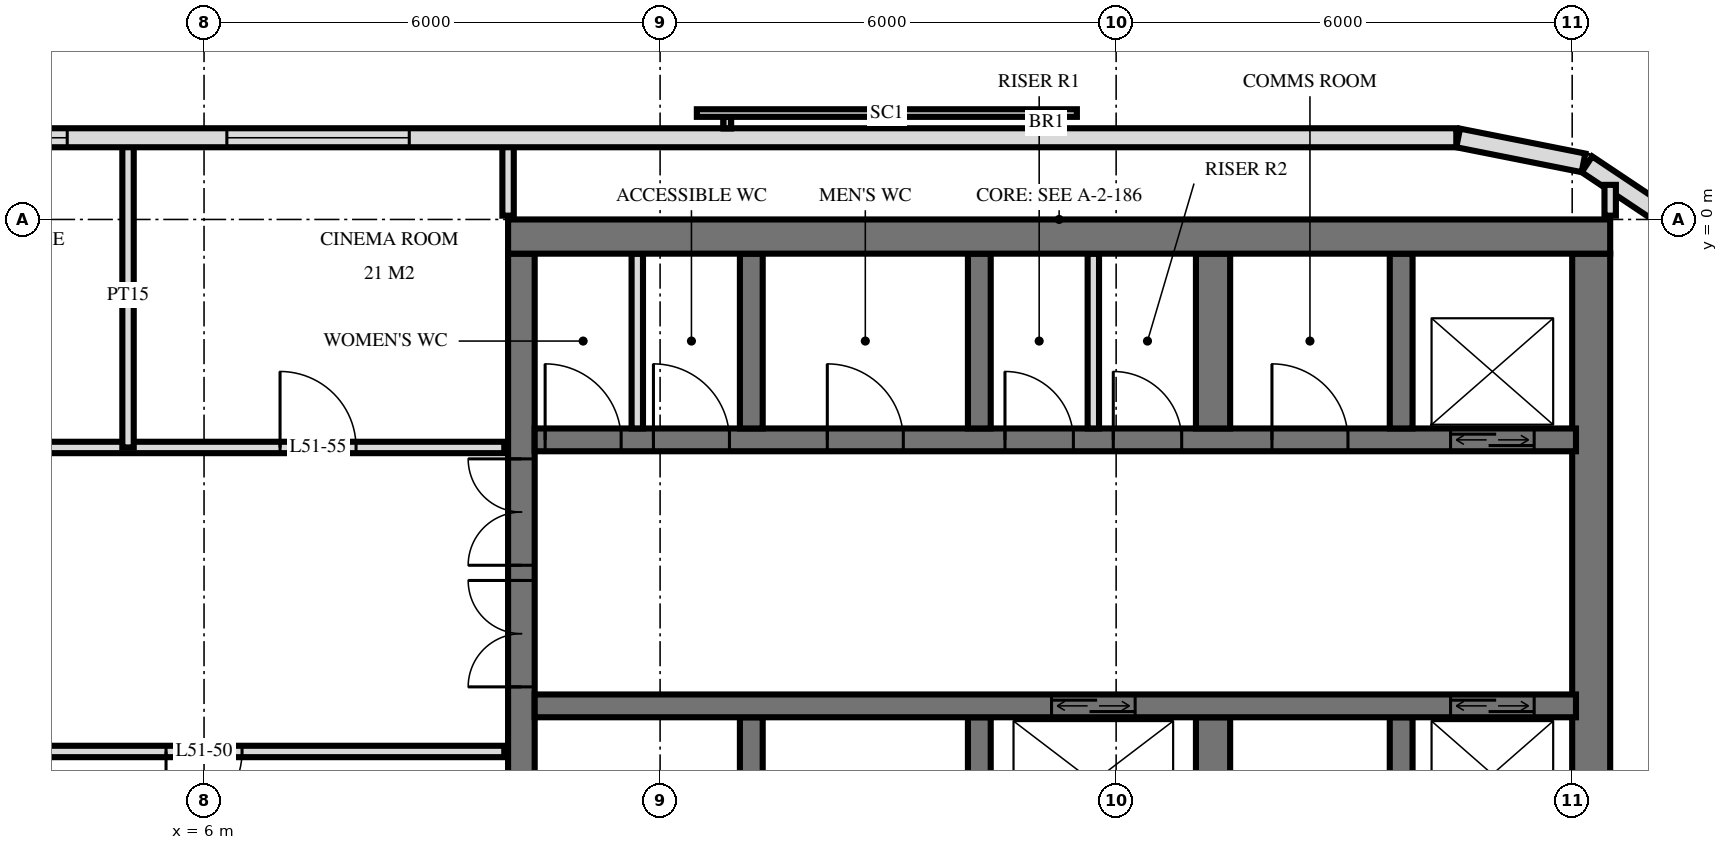
"""IFC4 building model, lengths in metres.
Left out: names, types, materials, properties, quantities, classifications, styles, units other than length and angle.
Written with IfcOpenShell. Run it as: python <this file> out.ifc"""

import sys

from ifc_helpers import new_model, si_unit, direction, frame, frame_2d, origin, place, context, subcontext, project, spatial, rectangle, extrude, element, fill, save


model = new_model("IFC4")
c1 = context("Model", 3, precision=1e-05, world=origin(), true_north=direction((0.0, 1.0)))
c2 = subcontext(c1, "Body", "Model", "MODEL_VIEW")
j1 = project(units=[si_unit("LENGTHUNIT", "METRE"), si_unit("PLANEANGLEUNIT", "RADIAN")], contexts=[c1])
p1 = place(None, origin())
s1 = spatial("IfcSite", under=j1, at=p1, CompositionType="ELEMENT")
p2 = place(p1, origin())
s2 = spatial("IfcBuilding", under=s1, at=p2, CompositionType="ELEMENT")
p3 = place(p2, frame((0.0, 0.0, 197.6)))
s3 = spatial("IfcBuildingStorey", under=s2, at=p3, CompositionType="ELEMENT", Elevation=197.6)
p4 = place(p3, frame((10.0, -0.225, 0.0), z_axis=(0.0, 0.0, 1.0), x_axis=(1.0, 0.0, 0.0)))
e1 = element("IfcWall", 1, at=p4, inside=s3, PredefinedType="SHEAR", context=c2, shape_type="SweptSolid", body=[
    extrude(rectangle(XDim=14.5, YDim=0.45, at=frame_2d((7.25, 0.0))), origin(), (0.0, 0.0, 1.0), 3.5),
])
p5 = place(p3, frame((10.175, -14.55, 0.0), z_axis=(0.0, 0.0, 1.0), x_axis=(0.0, 1.0, 0.0)))
e2 = element("IfcWall", 2, at=p5, inside=s3, PredefinedType="SHEAR", context=c2, shape_type="SweptSolid", body=[
    extrude(rectangle(XDim=14.1, YDim=0.35, at=frame_2d((7.05, 0.0))), origin(), (0.0, 0.0, 1.0), 3.5),
])
p6 = place(p5, frame((8.4, 0.0, 0.0)))
e3 = element("IfcOpeningElement", 3, at=p6, cuts=e2, PredefinedType="OPENING", context=c2, shape_type="SweptSolid", body=[
    extrude(rectangle(XDim=1.4, YDim=2.4, at=frame_2d((0.7, 1.2))), frame((0.0, 0.185, 0.0), z_axis=(0.0, -1.0, 0.0), x_axis=(1.0, 0.0, 0.0)), (0.0, 0.0, 1.0), 0.37),
])
p7 = place(p5, frame((10.0, 0.0, 0.0)))
e4 = element("IfcOpeningElement", 4, at=p7, cuts=e2, PredefinedType="OPENING", context=c2, shape_type="SweptSolid", body=[
    extrude(rectangle(XDim=1.4, YDim=2.4, at=frame_2d((0.7, 1.2))), frame((0.0, 0.185, 0.0), z_axis=(0.0, -1.0, 0.0), x_axis=(1.0, 0.0, 0.0)), (0.0, 0.0, 1.0), 0.37),
])
p8 = place(p5, frame((4.0, 0.0, 0.0)))
e5 = element("IfcOpeningElement", 5, at=p8, cuts=e2, PredefinedType="OPENING", context=c2, shape_type="SweptSolid", body=[
    extrude(rectangle(XDim=1.2, YDim=2.1, at=frame_2d((0.6, 1.05))), frame((0.0, 0.185, 0.0), z_axis=(0.0, -1.0, 0.0), x_axis=(1.0, 0.0, 0.0)), (0.0, 0.0, 1.0), 0.37),
])
p9 = place(p3, frame((24.25, -14.55, 0.0), z_axis=(0.0, 0.0, 1.0), x_axis=(0.0, 1.0, 0.0)))
e6 = element("IfcWall", 6, at=p9, inside=s3, PredefinedType="SHEAR", context=c2, shape_type="SweptSolid", body=[
    extrude(rectangle(XDim=14.1, YDim=0.5, at=frame_2d((7.05, 0.0))), origin(), (0.0, 0.0, 1.0), 3.5),
])
p10 = place(p3, frame((10.35, -2.9, 0.0), z_axis=(0.0, 0.0, 1.0), x_axis=(1.0, 0.0, 0.0)))
e7 = element("IfcWall", 7, at=p10, inside=s3, PredefinedType="SHEAR", context=c2, shape_type="SweptSolid", body=[
    extrude(rectangle(XDim=13.7, YDim=0.3, at=frame_2d((6.85, 0.0))), origin(), (0.0, 0.0, 1.0), 3.5),
])
p11 = place(p10, frame((12.05, 0.0, 0.0)))
e8 = element("IfcOpeningElement", 8, at=p11, cuts=e7, PredefinedType="OPENING", context=c2, shape_type="SweptSolid", body=[
    extrude(rectangle(XDim=1.1, YDim=2.1, at=frame_2d((0.55, 1.05))), frame((0.0, 0.16, 0.0), z_axis=(0.0, -1.0, 0.0), x_axis=(1.0, 0.0, 0.0)), (0.0, 0.0, 1.0), 0.32),
])
p12 = place(p10, frame((6.188, 0.0, 0.0)))
e9 = element("IfcOpeningElement", 9, at=p12, cuts=e7, PredefinedType="OPENING", context=c2, shape_type="SweptSolid", body=[
    extrude(rectangle(XDim=0.9, YDim=2.1, at=frame_2d((0.45, 1.05))), frame((0.0, 0.16, 0.0), z_axis=(0.0, -1.0, 0.0), x_axis=(1.0, 0.0, 0.0)), (0.0, 0.0, 1.0), 0.32),
])
p13 = place(p10, frame((7.613, 0.0, 0.0)))
e10 = element("IfcOpeningElement", 10, at=p13, cuts=e7, PredefinedType="OPENING", context=c2, shape_type="SweptSolid", body=[
    extrude(rectangle(XDim=0.9, YDim=2.1, at=frame_2d((0.45, 1.05))), frame((0.0, 0.16, 0.0), z_axis=(0.0, -1.0, 0.0), x_axis=(1.0, 0.0, 0.0)), (0.0, 0.0, 1.0), 0.32),
])
p14 = place(p10, frame((0.137, 0.0, 0.0)))
e11 = element("IfcOpeningElement", 11, at=p14, cuts=e7, PredefinedType="OPENING", context=c2, shape_type="SweptSolid", body=[
    extrude(rectangle(XDim=1.0, YDim=2.1, at=frame_2d((0.5, 1.05))), frame((0.0, 0.16, 0.0), z_axis=(0.0, -1.0, 0.0), x_axis=(1.0, 0.0, 0.0)), (0.0, 0.0, 1.0), 0.32),
])
p15 = place(p10, frame((1.562, 0.0, 0.0)))
e12 = element("IfcOpeningElement", 12, at=p15, cuts=e7, PredefinedType="OPENING", context=c2, shape_type="SweptSolid", body=[
    extrude(rectangle(XDim=1.0, YDim=2.1, at=frame_2d((0.5, 1.05))), frame((0.0, 0.16, 0.0), z_axis=(0.0, -1.0, 0.0), x_axis=(1.0, 0.0, 0.0)), (0.0, 0.0, 1.0), 0.32),
])
p16 = place(p10, frame((3.85, 0.0, 0.0)))
e13 = element("IfcOpeningElement", 13, at=p16, cuts=e7, PredefinedType="OPENING", context=c2, shape_type="SweptSolid", body=[
    extrude(rectangle(XDim=1.0, YDim=2.1, at=frame_2d((0.5, 1.05))), frame((0.0, 0.16, 0.0), z_axis=(0.0, -1.0, 0.0), x_axis=(1.0, 0.0, 0.0)), (0.0, 0.0, 1.0), 0.32),
])
p17 = place(p10, frame((9.7, 0.0, 0.0)))
e14 = element("IfcOpeningElement", 14, at=p17, cuts=e7, PredefinedType="OPENING", context=c2, shape_type="SweptSolid", body=[
    extrude(rectangle(XDim=1.0, YDim=2.1, at=frame_2d((0.5, 1.05))), frame((0.0, 0.16, 0.0), z_axis=(0.0, -1.0, 0.0), x_axis=(1.0, 0.0, 0.0)), (0.0, 0.0, 1.0), 0.32),
])
p18 = place(p3, frame((10.35, -6.4, 0.0), z_axis=(0.0, 0.0, 1.0), x_axis=(1.0, 0.0, 0.0)))
e15 = element("IfcWall", 15, at=p18, inside=s3, PredefinedType="SHEAR", context=c2, shape_type="SweptSolid", body=[
    extrude(rectangle(XDim=13.7, YDim=0.3, at=frame_2d((6.85, 0.0))), origin(), (0.0, 0.0, 1.0), 3.5),
])
p19 = place(p18, frame((12.05, 0.0, 0.0)))
e16 = element("IfcOpeningElement", 16, at=p19, cuts=e15, PredefinedType="OPENING", context=c2, shape_type="SweptSolid", body=[
    extrude(rectangle(XDim=1.1, YDim=2.1, at=frame_2d((0.55, 1.05))), frame((0.0, 0.16, 0.0), z_axis=(0.0, -1.0, 0.0), x_axis=(1.0, 0.0, 0.0)), (0.0, 0.0, 1.0), 0.32),
])
p20 = place(p18, frame((6.8, 0.0, 0.0)))
e17 = element("IfcOpeningElement", 17, at=p20, cuts=e15, PredefinedType="OPENING", context=c2, shape_type="SweptSolid", body=[
    extrude(rectangle(XDim=1.1, YDim=2.1, at=frame_2d((0.55, 1.05))), frame((0.0, 0.16, 0.0), z_axis=(0.0, -1.0, 0.0), x_axis=(1.0, 0.0, 0.0)), (0.0, 0.0, 1.0), 0.32),
])
for number, where, z_axis, x_axis in (
    (18, (13.2, -2.75, 0.0), (0.0, 0.0, 1.0), (0.0, 1.0, 0.0)),
    (19, (13.2, -8.85, 0.0), (0.0, 0.0, 1.0), (0.0, 1.0, 0.0)),
    (20, (16.2, -2.75, 0.0), (0.0, 0.0, 1.0), (0.0, 1.0, 0.0)),
    (21, (16.2, -8.85, 0.0), (0.0, 0.0, 1.0), (0.0, 1.0, 0.0)),
):
    element("IfcWall", number, at=place(p3, frame(where, z_axis=z_axis, x_axis=x_axis)), inside=s3, PredefinedType="SHEAR", context=c2, shape_type="SweptSolid", body=[
        extrude(rectangle(XDim=2.3, YDim=0.3, at=frame_2d((1.15, 0.0))), origin(), (0.0, 0.0, 1.0), 3.5),
    ])
for number, where, z_axis, x_axis in (
    (22, (19.275, -2.75, 0.0), (0.0, 0.0, 1.0), (0.0, 1.0, 0.0)),
    (23, (19.275, -8.85, 0.0), (0.0, 0.0, 1.0), (0.0, 1.0, 0.0)),
):
    element("IfcWall", number, at=place(p3, frame(where, z_axis=z_axis, x_axis=x_axis)), inside=s3, PredefinedType="SHEAR", context=c2, shape_type="SweptSolid", body=[
        extrude(rectangle(XDim=2.3, YDim=0.45, at=frame_2d((1.15, 0.0))), origin(), (0.0, 0.0, 1.0), 3.5),
    ])
for number, where, z_axis, x_axis in (
    (24, (21.75, -2.75, 0.0), (0.0, 0.0, 1.0), (0.0, 1.0, 0.0)),
    (25, (21.75, -8.85, 0.0), (0.0, 0.0, 1.0), (0.0, 1.0, 0.0)),
):
    element("IfcWall", number, at=place(p3, frame(where, z_axis=z_axis, x_axis=x_axis)), inside=s3, PredefinedType="SHEAR", context=c2, shape_type="SweptSolid", body=[
        extrude(rectangle(XDim=2.3, YDim=0.3, at=frame_2d((1.15, 0.0))), origin(), (0.0, 0.0, 1.0), 3.5),
    ])
p21 = place(p3, frame((25.571, -0.194, 0.0), z_axis=(0.0, 0.0, 1.0), x_axis=(-0.831482937015, 0.55555029066, 0.0)))
e26 = element("IfcWall", 26, at=p21, inside=s3, PredefinedType="SOLIDWALL", context=c2, shape_type="SweptSolid", body=[
    extrude(rectangle(XDim=1.656, YDim=0.25, at=frame_2d((0.828, 0.0))), origin(), (0.0, 0.0, 1.0), 3.22),
])
p22 = place(p3, frame((24.149, 0.745, 0.0), z_axis=(0.0, 0.0, 1.0), x_axis=(-0.980803419081, 0.194999110559, 0.0)))
e27 = element("IfcWall", 27, at=p22, inside=s3, PredefinedType="SOLIDWALL", context=c2, shape_type="SweptSolid", body=[
    extrude(rectangle(XDim=1.681, YDim=0.25, at=frame_2d((0.841, 0.0))), origin(), (0.0, 0.0, 1.0), 3.22),
])
p23 = place(p3, frame((22.475, 1.075, 0.0), z_axis=(0.0, 0.0, 1.0), x_axis=(-1.0, 0.0, 0.0)))
e28 = element("IfcWall", 28, at=p23, inside=s3, PredefinedType="SOLIDWALL", context=c2, shape_type="SweptSolid", body=[
    extrude(rectangle(XDim=44.951, YDim=0.25, at=frame_2d((22.475, 0.0))), origin(), (0.0, 0.0, 1.0), 3.22),
])
p24 = place(p23, frame((13.775, 0.0, 0.9)))
e29 = element("IfcOpeningElement", 29, at=p24, cuts=e28, PredefinedType="OPENING", context=c2, shape_type="SweptSolid", body=[
    extrude(rectangle(XDim=2.4, YDim=1.5, at=frame_2d((1.2, 0.75))), frame((0.0, 0.135, 0.0), z_axis=(0.0, -1.0, 0.0), x_axis=(1.0, 0.0, 0.0)), (0.0, 0.0, 1.0), 0.27),
])
p25 = place(p23, frame((18.275, 0.0, 0.9)))
e30 = element("IfcOpeningElement", 30, at=p25, cuts=e28, PredefinedType="OPENING", context=c2, shape_type="SweptSolid", body=[
    extrude(rectangle(XDim=2.4, YDim=1.5, at=frame_2d((1.2, 0.75))), frame((0.0, 0.135, 0.0), z_axis=(0.0, -1.0, 0.0), x_axis=(1.0, 0.0, 0.0)), (0.0, 0.0, 1.0), 0.27),
])
p26 = place(p23, frame((29.025, 0.0, 0.9)))
e31 = element("IfcOpeningElement", 31, at=p26, cuts=e28, PredefinedType="OPENING", context=c2, shape_type="SweptSolid", body=[
    extrude(rectangle(XDim=2.4, YDim=1.5, at=frame_2d((1.2, 0.75))), frame((0.0, 0.135, 0.0), z_axis=(0.0, -1.0, 0.0), x_axis=(1.0, 0.0, 0.0)), (0.0, 0.0, 1.0), 0.27),
])
for number, where, z_axis, x_axis in (
    (32, (17.7, -2.75, 0.0), (0.0, 0.0, 1.0), (0.0, 1.0, 0.0)),
    (33, (11.7, -2.75, 0.0), (0.0, 0.0, 1.0), (0.0, 1.0, 0.0)),
):
    element("IfcWall", number, at=place(p3, frame(where, z_axis=z_axis, x_axis=x_axis)), inside=s3, PredefinedType="PARTITIONING", context=c2, shape_type="SweptSolid", body=[
        extrude(rectangle(XDim=2.3, YDim=0.15, at=frame_2d((1.15, 0.0))), origin(), (0.0, 0.0, 1.0), 3.2),
    ])
p27 = place(p3, frame((24.5, 0.05, 0.0), z_axis=(0.0, 0.0, 1.0), x_axis=(0.0, 1.0, 0.0)))
e34 = element("IfcWall", 34, at=p27, inside=s3, PredefinedType="PARTITIONING", context=c2, shape_type="SweptSolid", body=[
    extrude(rectangle(XDim=0.405, YDim=0.15, at=frame_2d((0.203, 0.0))), origin(), (0.0, 0.0, 1.0), 3.22),
])
p28 = place(p3, frame((10.0, 0.05, 0.0), z_axis=(0.0, 0.0, 1.0), x_axis=(0.0, 1.0, 0.0)))
e35 = element("IfcWall", 35, at=p28, inside=s3, PredefinedType="PARTITIONING", context=c2, shape_type="SweptSolid", body=[
    extrude(rectangle(XDim=0.97, YDim=0.15, at=frame_2d((0.485, 0.0))), origin(), (0.0, 0.0, 1.0), 3.22),
])
p29 = place(p3, frame((5.0, -3.0, 0.0), z_axis=(0.0, 0.0, 1.0), x_axis=(0.0, 1.0, 0.0)))
e36 = element("IfcWall", 36, at=p29, inside=s3, PredefinedType="PARTITIONING", context=c2, shape_type="SweptSolid", body=[
    extrude(rectangle(XDim=4.02, YDim=0.15, at=frame_2d((2.01, 0.0))), origin(), (0.0, 0.0, 1.0), 3.22),
])
p30 = place(p3, frame((-9.95, -7.0, 0.0), z_axis=(0.0, 0.0, 1.0), x_axis=(1.0, 0.0, 0.0)))
e37 = element("IfcWall", 37, at=p30, inside=s3, PredefinedType="PARTITIONING", context=c2, shape_type="SweptSolid", body=[
    extrude(rectangle(XDim=19.9, YDim=0.15, at=frame_2d((9.95, 0.0))), origin(), (0.0, 0.0, 1.0), 3.22),
])
p31 = place(p30, frame((9.45, 0.0, 0.0)))
e38 = element("IfcOpeningElement", 38, at=p31, cuts=e37, PredefinedType="OPENING", context=c2, shape_type="SweptSolid", body=[
    extrude(rectangle(XDim=1.0, YDim=2.1, at=frame_2d((0.5, 1.05))), frame((0.0, 0.085, 0.0), z_axis=(0.0, -1.0, 0.0), x_axis=(1.0, 0.0, 0.0)), (0.0, 0.0, 1.0), 0.17),
])
p32 = place(p30, frame((15.45, 0.0, 0.0)))
e39 = element("IfcOpeningElement", 39, at=p32, cuts=e37, PredefinedType="OPENING", context=c2, shape_type="SweptSolid", body=[
    extrude(rectangle(XDim=1.0, YDim=2.1, at=frame_2d((0.5, 1.05))), frame((0.0, 0.085, 0.0), z_axis=(0.0, -1.0, 0.0), x_axis=(1.0, 0.0, 0.0)), (0.0, 0.0, 1.0), 0.17),
])
p33 = place(p3, frame((-9.95, -3.0, 0.0), z_axis=(0.0, 0.0, 1.0), x_axis=(1.0, 0.0, 0.0)))
e40 = element("IfcWall", 40, at=p33, inside=s3, PredefinedType="PARTITIONING", context=c2, shape_type="SweptSolid", body=[
    extrude(rectangle(XDim=19.9, YDim=0.15, at=frame_2d((9.95, 0.0))), origin(), (0.0, 0.0, 1.0), 3.22),
])
p34 = place(p33, frame((1.7, 0.0, 0.0)))
e41 = element("IfcOpeningElement", 41, at=p34, cuts=e40, PredefinedType="OPENING", context=c2, shape_type="SweptSolid", body=[
    extrude(rectangle(XDim=1.0, YDim=2.1, at=frame_2d((0.5, 1.05))), frame((0.0, 0.085, 0.0), z_axis=(0.0, -1.0, 0.0), x_axis=(1.0, 0.0, 0.0)), (0.0, 0.0, 1.0), 0.17),
])
p35 = place(p33, frame((5.45, 0.0, 0.0)))
e42 = element("IfcOpeningElement", 42, at=p35, cuts=e40, PredefinedType="OPENING", context=c2, shape_type="SweptSolid", body=[
    extrude(rectangle(XDim=1.0, YDim=2.1, at=frame_2d((0.5, 1.05))), frame((0.0, 0.085, 0.0), z_axis=(0.0, -1.0, 0.0), x_axis=(1.0, 0.0, 0.0)), (0.0, 0.0, 1.0), 0.17),
])
p36 = place(p33, frame((8.2, 0.0, 0.0)))
e43 = element("IfcOpeningElement", 43, at=p36, cuts=e40, PredefinedType="OPENING", context=c2, shape_type="SweptSolid", body=[
    extrude(rectangle(XDim=1.0, YDim=2.1, at=frame_2d((0.5, 1.05))), frame((0.0, 0.085, 0.0), z_axis=(0.0, -1.0, 0.0), x_axis=(1.0, 0.0, 0.0)), (0.0, 0.0, 1.0), 0.17),
])
p37 = place(p33, frame((11.95, 0.0, 0.0)))
e44 = element("IfcOpeningElement", 44, at=p37, cuts=e40, PredefinedType="OPENING", context=c2, shape_type="SweptSolid", body=[
    extrude(rectangle(XDim=1.0, YDim=2.1, at=frame_2d((0.5, 1.05))), frame((0.0, 0.085, 0.0), z_axis=(0.0, -1.0, 0.0), x_axis=(1.0, 0.0, 0.0)), (0.0, 0.0, 1.0), 0.17),
])
p38 = place(p33, frame((16.95, 0.0, 0.0)))
e45 = element("IfcOpeningElement", 45, at=p38, cuts=e40, PredefinedType="OPENING", context=c2, shape_type="SweptSolid", body=[
    extrude(rectangle(XDim=1.0, YDim=2.1, at=frame_2d((0.5, 1.05))), frame((0.0, 0.085, 0.0), z_axis=(0.0, -1.0, 0.0), x_axis=(1.0, 0.0, 0.0)), (0.0, 0.0, 1.0), 0.17),
])
p39 = place(p24, origin())
e46 = element("IfcWindow", 46, at=p39, inside=s3, PartitioningType="SINGLE_PANEL", PredefinedType="WINDOW", context=c2, shape_type="SweptSolid", body=[
    extrude(rectangle(XDim=2.4, YDim=1.5, at=frame_2d((1.2, 0.75))), frame((0.0, 0.03, 0.0), z_axis=(0.0, -1.0, 0.0), x_axis=(1.0, 0.0, 0.0)), (0.0, 0.0, 1.0), 0.06),
])
fill(e29, e46)
p40 = place(p25, origin())
e47 = element("IfcWindow", 47, at=p40, inside=s3, PartitioningType="SINGLE_PANEL", PredefinedType="WINDOW", context=c2, shape_type="SweptSolid", body=[
    extrude(rectangle(XDim=2.4, YDim=1.5, at=frame_2d((1.2, 0.75))), frame((0.0, 0.03, 0.0), z_axis=(0.0, -1.0, 0.0), x_axis=(1.0, 0.0, 0.0)), (0.0, 0.0, 1.0), 0.06),
])
fill(e30, e47)
p41 = place(p11, origin())
e48 = element("IfcDoor", 48, at=p41, inside=s3, OperationType="DOUBLE_DOOR_SLIDING", PredefinedType="USERDEFINED", context=c2, shape_type="SweptSolid", body=[
    extrude(rectangle(XDim=1.1, YDim=2.1, at=frame_2d((0.55, 1.05))), frame((0.0, 0.025, 0.0), z_axis=(0.0, -1.0, 0.0), x_axis=(1.0, 0.0, 0.0)), (0.0, 0.0, 1.0), 0.05),
])
fill(e8, e48)
p42 = place(p19, origin())
e49 = element("IfcDoor", 49, at=p42, inside=s3, OperationType="DOUBLE_DOOR_SLIDING", PredefinedType="USERDEFINED", context=c2, shape_type="SweptSolid", body=[
    extrude(rectangle(XDim=1.1, YDim=2.1, at=frame_2d((0.55, 1.05))), frame((0.0, 0.025, 0.0), z_axis=(0.0, -1.0, 0.0), x_axis=(1.0, 0.0, 0.0)), (0.0, 0.0, 1.0), 0.05),
])
fill(e16, e49)
p43 = place(p20, origin())
e50 = element("IfcDoor", 50, at=p43, inside=s3, OperationType="DOUBLE_DOOR_SLIDING", PredefinedType="USERDEFINED", context=c2, shape_type="SweptSolid", body=[
    extrude(rectangle(XDim=1.1, YDim=2.1, at=frame_2d((0.55, 1.05))), frame((0.0, 0.025, 0.0), z_axis=(0.0, -1.0, 0.0), x_axis=(1.0, 0.0, 0.0)), (0.0, 0.0, 1.0), 0.05),
])
fill(e17, e50)
p44 = place(p6, origin())
e51 = element("IfcDoor", 51, at=p44, inside=s3, OperationType="DOUBLE_DOOR_SINGLE_SWING", PredefinedType="DOOR", context=c2, shape_type="SweptSolid", body=[
    extrude(rectangle(XDim=1.4, YDim=2.4, at=frame_2d((0.7, 1.2))), frame((0.0, 0.025, 0.0), z_axis=(0.0, -1.0, 0.0), x_axis=(1.0, 0.0, 0.0)), (0.0, 0.0, 1.0), 0.05),
])
fill(e3, e51)
p45 = place(p7, origin())
e52 = element("IfcDoor", 52, at=p45, inside=s3, OperationType="DOUBLE_DOOR_SINGLE_SWING", PredefinedType="DOOR", context=c2, shape_type="SweptSolid", body=[
    extrude(rectangle(XDim=1.4, YDim=2.4, at=frame_2d((0.7, 1.2))), frame((0.0, 0.025, 0.0), z_axis=(0.0, -1.0, 0.0), x_axis=(1.0, 0.0, 0.0)), (0.0, 0.0, 1.0), 0.05),
])
fill(e4, e52)
p46 = place(p12, origin())
e53 = element("IfcDoor", 53, at=p46, inside=s3, OperationType="SINGLE_SWING_RIGHT", PredefinedType="DOOR", context=c2, shape_type="SweptSolid", body=[
    extrude(rectangle(XDim=0.9, YDim=2.1, at=frame_2d((0.45, 1.05))), frame((0.0, 0.025, 0.0), z_axis=(0.0, -1.0, 0.0), x_axis=(1.0, 0.0, 0.0)), (0.0, 0.0, 1.0), 0.05),
])
fill(e9, e53)
p47 = place(p13, origin())
e54 = element("IfcDoor", 54, at=p47, inside=s3, OperationType="SINGLE_SWING_RIGHT", PredefinedType="DOOR", context=c2, shape_type="SweptSolid", body=[
    extrude(rectangle(XDim=0.9, YDim=2.1, at=frame_2d((0.45, 1.05))), frame((0.0, 0.025, 0.0), z_axis=(0.0, -1.0, 0.0), x_axis=(1.0, 0.0, 0.0)), (0.0, 0.0, 1.0), 0.05),
])
fill(e10, e54)
p48 = place(p14, origin())
e55 = element("IfcDoor", 55, at=p48, inside=s3, OperationType="SINGLE_SWING_RIGHT", PredefinedType="DOOR", context=c2, shape_type="SweptSolid", body=[
    extrude(rectangle(XDim=1.0, YDim=2.1, at=frame_2d((0.5, 1.05))), frame((0.0, 0.025, 0.0), z_axis=(0.0, -1.0, 0.0), x_axis=(1.0, 0.0, 0.0)), (0.0, 0.0, 1.0), 0.05),
])
fill(e11, e55)
p49 = place(p15, origin())
e56 = element("IfcDoor", 56, at=p49, inside=s3, OperationType="SINGLE_SWING_RIGHT", PredefinedType="DOOR", context=c2, shape_type="SweptSolid", body=[
    extrude(rectangle(XDim=1.0, YDim=2.1, at=frame_2d((0.5, 1.05))), frame((0.0, 0.025, 0.0), z_axis=(0.0, -1.0, 0.0), x_axis=(1.0, 0.0, 0.0)), (0.0, 0.0, 1.0), 0.05),
])
fill(e12, e56)
p50 = place(p16, origin())
e57 = element("IfcDoor", 57, at=p50, inside=s3, OperationType="SINGLE_SWING_RIGHT", PredefinedType="DOOR", context=c2, shape_type="SweptSolid", body=[
    extrude(rectangle(XDim=1.0, YDim=2.1, at=frame_2d((0.5, 1.05))), frame((0.0, 0.025, 0.0), z_axis=(0.0, -1.0, 0.0), x_axis=(1.0, 0.0, 0.0)), (0.0, 0.0, 1.0), 0.05),
])
fill(e13, e57)
p51 = place(p17, origin())
e58 = element("IfcDoor", 58, at=p51, inside=s3, OperationType="SINGLE_SWING_RIGHT", PredefinedType="DOOR", context=c2, shape_type="SweptSolid", body=[
    extrude(rectangle(XDim=1.0, YDim=2.1, at=frame_2d((0.5, 1.05))), frame((0.0, 0.025, 0.0), z_axis=(0.0, -1.0, 0.0), x_axis=(1.0, 0.0, 0.0)), (0.0, 0.0, 1.0), 0.05),
])
fill(e14, e58)
p52 = place(p32, frame((0.5, 0.0, 0.0), z_axis=(0.0, 0.0, 1.0), x_axis=(-1.0, 0.0, 0.0)))
e59 = element("IfcDoor", 59, at=p52, inside=s3, OperationType="SINGLE_SWING_LEFT", PredefinedType="DOOR", context=c2, shape_type="SweptSolid", body=[
    extrude(rectangle(XDim=1.0, YDim=2.1, at=frame_2d((0.0, 1.05))), frame((0.0, -0.025, 0.0), z_axis=(0.0, 1.0, 0.0), x_axis=(-1.0, 0.0, 0.0)), (0.0, 0.0, 1.0), 0.05),
])
fill(e39, e59)
p53 = place(p38, origin())
e60 = element("IfcDoor", 60, at=p53, inside=s3, OperationType="SINGLE_SWING_RIGHT", PredefinedType="DOOR", context=c2, shape_type="SweptSolid", body=[
    extrude(rectangle(XDim=1.0, YDim=2.1, at=frame_2d((0.5, 1.05))), frame((0.0, 0.025, 0.0), z_axis=(0.0, -1.0, 0.0), x_axis=(1.0, 0.0, 0.0)), (0.0, 0.0, 1.0), 0.05),
])
fill(e45, e60)
save(model, sys.argv[1])
